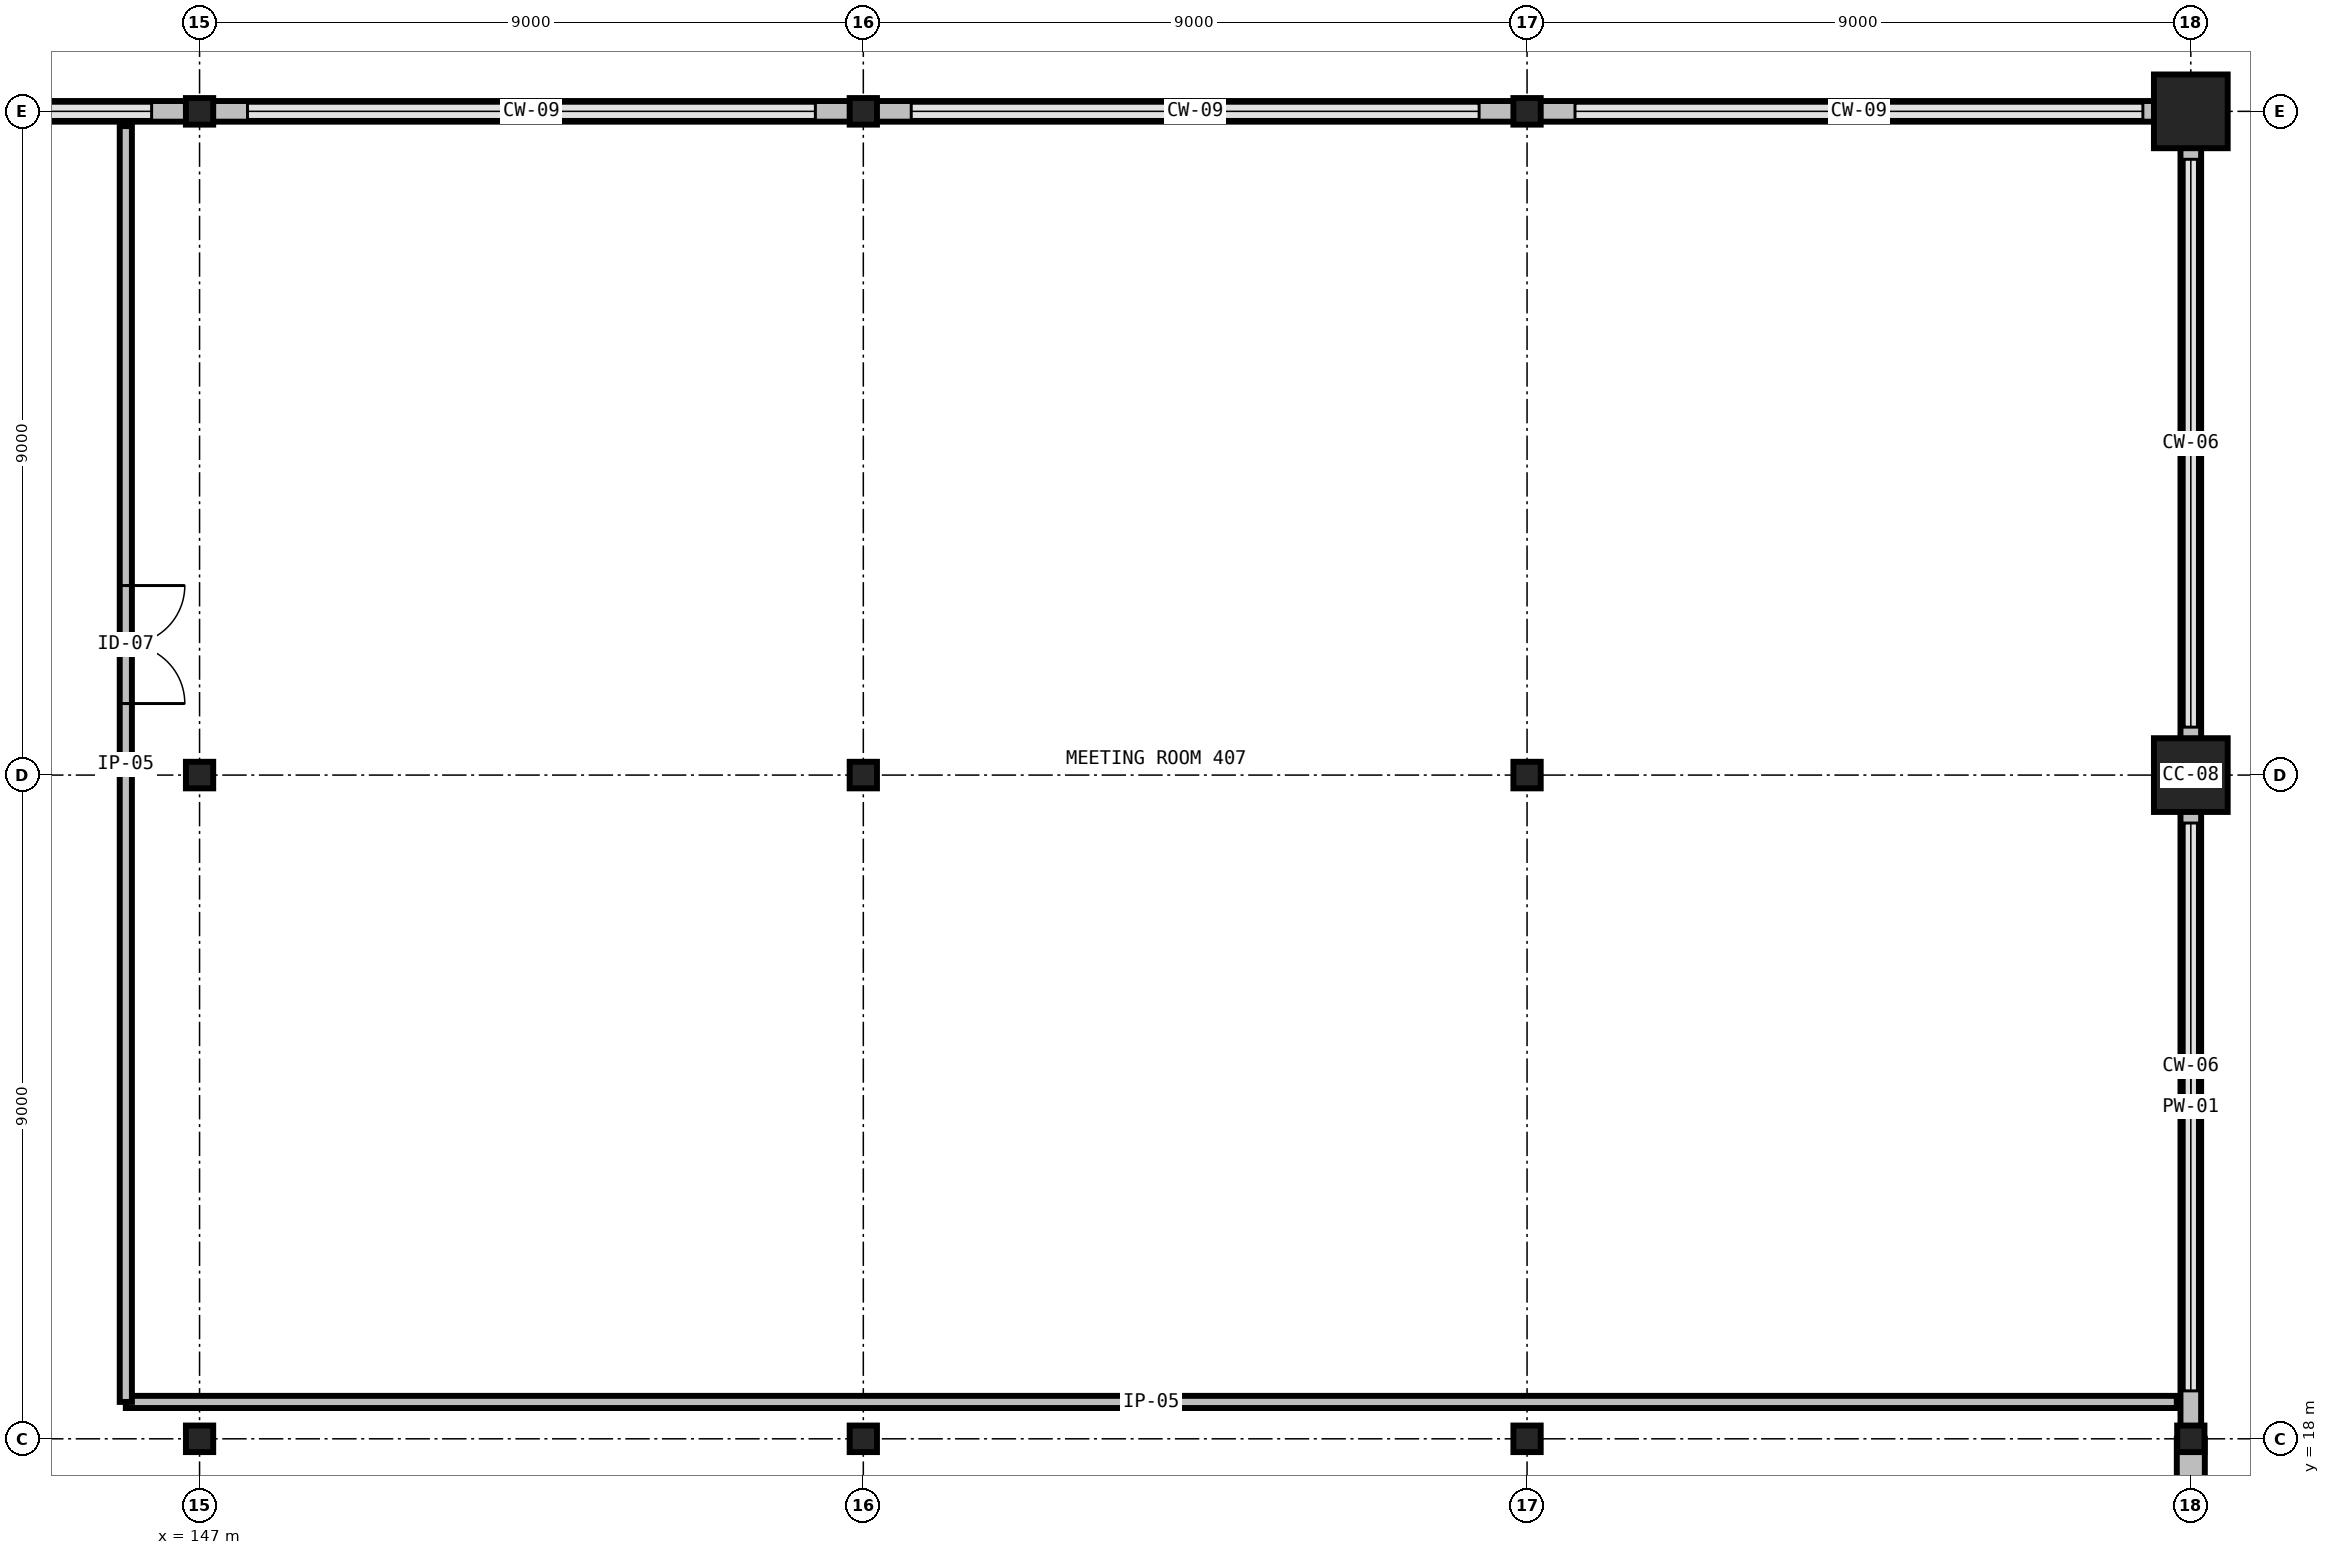
"""IFC4 building model, lengths in metres.
Left out: names, types, materials, properties, quantities, classifications, styles, units other than length and angle.
Written with IfcOpenShell. Run it as: python <this file> out.ifc"""

import sys

from ifc_helpers import new_model, si_unit, direction, frame, frame_2d, origin, origin_2d, place, context, subcontext, project, spatial, rectangle, circle, i_section, extrude, element, fill, save


model = new_model("IFC4")
c1 = context("Model", 3, precision=1e-05, world=origin(), true_north=direction((0.0, 1.0)))
c2 = subcontext(c1, "Body", "Model", "MODEL_VIEW")
j1 = project(units=[si_unit("LENGTHUNIT", "METRE"), si_unit("PLANEANGLEUNIT", "RADIAN")], contexts=[c1])
p1 = place(None, origin())
s1 = spatial("IfcSite", under=j1, at=p1, CompositionType="ELEMENT")
p2 = place(p1, origin())
s2 = spatial("IfcBuilding", under=s1, at=p2, CompositionType="ELEMENT")
p3 = place(p2, frame((0.0, 0.0, 23.4)))
s3 = spatial("IfcBuildingStorey", under=s2, at=p3, CompositionType="ELEMENT", Elevation=23.4)
for number, where, z_axis, x_axis in (
    (1, (147.0, 18.0, 0.0), (0.0, 0.0, 1.0), (1.0, 0.0, 0.0)),
    (2, (147.0, 27.0, 0.0), (0.0, 0.0, 1.0), (1.0, 0.0, 0.0)),
    (3, (147.0, 36.0, 0.0), (0.0, 0.0, 1.0), (1.0, 0.0, 0.0)),
    (4, (156.0, 18.0, 0.0), (0.0, 0.0, 1.0), (1.0, 0.0, 0.0)),
    (5, (156.0, 27.0, 0.0), (0.0, 0.0, 1.0), (1.0, 0.0, 0.0)),
    (6, (156.0, 36.0, 0.0), (0.0, 0.0, 1.0), (1.0, 0.0, 0.0)),
    (7, (165.0, 18.0, 0.0), (0.0, 0.0, 1.0), (1.0, 0.0, 0.0)),
    (8, (165.0, 27.0, 0.0), (0.0, 0.0, 1.0), (1.0, 0.0, 0.0)),
    (9, (165.0, 36.0, 0.0), (0.0, 0.0, 1.0), (1.0, 0.0, 0.0)),
    (10, (174.0, 18.0, 0.0), (0.0, 0.0, 1.0), (1.0, 0.0, 0.0)),
):
    element("IfcColumn", number, at=place(p3, frame(where, z_axis=z_axis, x_axis=x_axis)), inside=s3, PredefinedType="COLUMN", context=c2, shape_type="SweptSolid", body=[
        extrude(i_section(OverallWidth=0.37, OverallDepth=0.36, WebThickness=0.012, FlangeThickness=0.02, FilletRadius=0.031, at=origin_2d()), origin(), (0.0, 0.0, 1.0), 3.85),
    ])
for number, where, z_axis, x_axis in (
    (11, (174.0, 27.0, 0.0), (0.0, 0.0, 1.0), (1.0, 0.0, 0.0)),
    (12, (174.0, 36.0, 0.0), (0.0, 0.0, 1.0), (1.0, 0.0, 0.0)),
):
    element("IfcColumn", number, at=place(p3, frame(where, z_axis=z_axis, x_axis=x_axis)), inside=s3, PredefinedType="COLUMN", context=c2, shape_type="SweptSolid", body=[
        extrude(circle(Radius=0.5, at=origin_2d()), origin(), (0.0, 0.0, 1.0), 3.85),
    ])
p4 = place(p3, frame((174.0, 9.0, 0.0), z_axis=(0.0, 0.0, 1.0), x_axis=(0.0, 1.0, 0.0)))
e13 = element("IfcWall", 13, at=p4, inside=s3, PredefinedType="STANDARD", context=c2, shape_type="SweptSolid", body=[
    extrude(rectangle(XDim=9.0, YDim=0.38, at=frame_2d((4.5, 0.0))), origin(), (0.0, 0.0, 1.0), 3.119),
])
for number, where, z_axis, x_axis in (
    (14, (174.0, 18.0, 0.0), (0.0, 0.0, 1.0), (0.0, 1.0, 0.0)),
    (15, (174.0, 27.0, 0.0), (0.0, 0.0, 1.0), (0.0, 1.0, 0.0)),
    (16, (147.0, 36.0, 0.0), (0.0, 0.0, 1.0), (-1.0, 0.0, 0.0)),
    (17, (156.0, 36.0, 0.0), (0.0, 0.0, 1.0), (-1.0, 0.0, 0.0)),
    (18, (165.0, 36.0, 0.0), (0.0, 0.0, 1.0), (-1.0, 0.0, 0.0)),
    (19, (174.0, 36.0, 0.0), (0.0, 0.0, 1.0), (-1.0, 0.0, 0.0)),
):
    element("IfcWall", number, at=place(p3, frame(where, z_axis=z_axis, x_axis=x_axis)), inside=s3, PredefinedType="PARAPET", context=c2, shape_type="SweptSolid", body=[
        extrude(rectangle(XDim=9.0, YDim=0.28, at=frame_2d((4.5, 0.0))), origin(), (0.0, 0.0, 1.0), 0.2),
    ])
p5 = place(p3, frame((173.86, 0.28, 3.85), z_axis=(0.0, 0.0, 1.0), x_axis=(0.0, 1.0, 0.0)))
e20 = element("IfcWall", 20, at=p5, inside=s3, PredefinedType="PARAPET", context=c2, shape_type="SweptSolid", body=[
    extrude(rectangle(XDim=35.44, YDim=0.28, at=frame_2d((17.72, 0.0))), origin(), (0.0, 0.0, 1.0), 1.2),
])
p6 = place(p3, frame((174.0, 35.86, 3.85), z_axis=(0.0, 0.0, 1.0), x_axis=(-1.0, 0.0, 0.0)))
e21 = element("IfcWall", 21, at=p6, inside=s3, PredefinedType="PARAPET", context=c2, shape_type="SweptSolid", body=[
    extrude(rectangle(XDim=36.0, YDim=0.28, at=frame_2d((18.0, 0.0))), origin(), (0.0, 0.0, 1.0), 1.2),
])
p7 = place(p3, frame((146.0, 18.5, 0.0), z_axis=(0.0, 0.0, 1.0), x_axis=(1.0, 0.0, 0.0)))
e22 = element("IfcWall", 22, at=p7, inside=s3, PredefinedType="PARTITIONING", context=c2, shape_type="SweptSolid", body=[
    extrude(rectangle(XDim=27.81, YDim=0.165, at=frame_2d((13.905, 0.0))), origin(), (0.0, 0.0, 1.0), 3.53),
])
p8 = place(p3, frame((146.0, 35.8, 0.0), z_axis=(0.0, 0.0, 1.0), x_axis=(0.0, -1.0, 0.0)))
e23 = element("IfcWall", 23, at=p8, inside=s3, PredefinedType="PARTITIONING", context=c2, shape_type="SweptSolid", body=[
    extrude(rectangle(XDim=17.3, YDim=0.165, at=frame_2d((8.65, 0.0))), origin(), (0.0, 0.0, 1.0), 3.53),
])
p9 = place(p8, frame((6.23, 0.0, 0.0)))
e24 = element("IfcOpeningElement", 24, at=p9, cuts=e23, PredefinedType="OPENING", context=c2, shape_type="SweptSolid", body=[
    extrude(rectangle(XDim=1.6, YDim=2.25, at=frame_2d((0.8, 1.125))), frame((0.0, 0.098, 0.0), z_axis=(0.0, -1.0, 0.0), x_axis=(1.0, 0.0, 0.0)), (0.0, 0.0, 1.0), 0.195),
])
p10 = place(p3, frame((0.0, 0.0, 3.53)))
p11 = place(p10, frame((160.5, 22.5, 0.0)))
p12 = place(p11, frame((0.0, 0.0, 0.27)))
e25 = element("IfcWindow", 25, at=p12, inside=s3, PartitioningType="SINGLE_PANEL", PredefinedType="SKYLIGHT", context=c2, shape_type="SweptSolid", body=[
    extrude(rectangle(XDim=2.0, YDim=2.8, at=origin_2d()), origin(), (0.0, 0.0, 1.0), 0.05),
])
p13 = place(p9, origin())
e26 = element("IfcDoor", 26, at=p13, inside=s3, OperationType="DOUBLE_DOOR_SINGLE_SWING", PredefinedType="DOOR", context=c2, shape_type="SweptSolid", body=[
    extrude(rectangle(XDim=1.6, YDim=2.25, at=frame_2d((0.8, 1.125))), frame((0.0, 0.025, 0.0), z_axis=(0.0, -1.0, 0.0), x_axis=(1.0, 0.0, 0.0)), (0.0, 0.0, 1.0), 0.05),
])
fill(e24, e26)
save(model, sys.argv[1])
